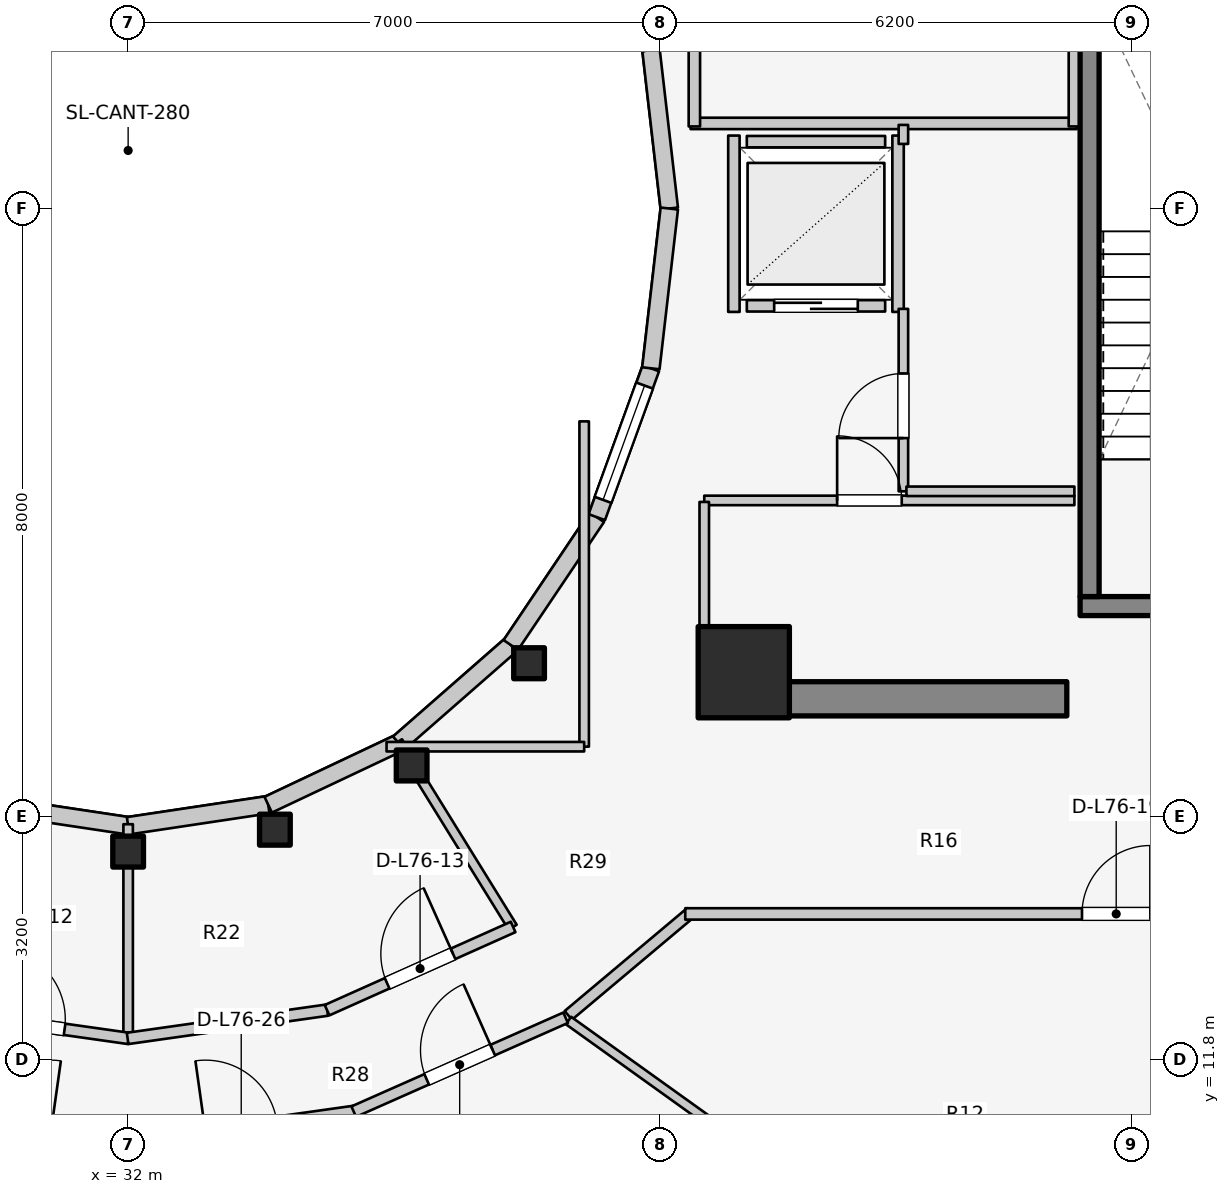
"""IFC4 building model, lengths in metres.
Left out: names, types, materials, properties, quantities, classifications, styles, units other than length and angle.
Written with IfcOpenShell. Run it as: python <this file> out.ifc"""

import sys

from ifc_helpers import new_model, si_unit, direction, frame, frame_2d, origin, origin_2d, place, context, subcontext, project, spatial, rectangle, i_section, extrude, element, fill, save


model = new_model("IFC4")
c1 = context("Model", 3, precision=1e-05, world=origin(), true_north=direction((0.0, 1.0)))
c2 = subcontext(c1, "Body", "Model", "MODEL_VIEW")
j1 = project(units=[si_unit("LENGTHUNIT", "METRE"), si_unit("PLANEANGLEUNIT", "RADIAN")], contexts=[c1])
p1 = place(None, origin())
s1 = spatial("IfcSite", under=j1, at=p1, CompositionType="ELEMENT")
p2 = place(p1, origin())
s2 = spatial("IfcBuilding", under=s1, at=p2, CompositionType="ELEMENT")
p3 = place(p2, frame((0.0, 0.0, 249.6)))
s3 = spatial("IfcBuildingStorey", under=s2, at=p3, CompositionType="ELEMENT", Elevation=249.6)
p4 = place(p3, frame((39.85, 16.55, 0.0), z_axis=(0.0, 0.0, 1.0), x_axis=(1.0, 0.0, 0.0)))
e1 = element("IfcWall", 1, at=p4, inside=s3, PredefinedType="SHEAR", context=c2, shape_type="SweptSolid", body=[
    extrude(rectangle(XDim=4.5, YDim=0.45, at=frame_2d((2.25, 0.0))), origin(), (0.0, 0.0, 1.0), 3.6),
])
p5 = place(p3, frame((44.525, 17.77, 0.0), z_axis=(0.0, 0.0, 1.0), x_axis=(1.0, 0.0, 0.0)))
e2 = element("IfcWall", 2, at=p5, inside=s3, PredefinedType="SOLIDWALL", context=c2, shape_type="SweptSolid", body=[
    extrude(rectangle(XDim=3.37, YDim=0.25, at=frame_2d((1.685, 0.0))), origin(), (0.0, 0.0, 1.0), 3.6),
])
p6 = place(p5, frame((1.135, 0.0, 0.0)))
e3 = element("IfcOpeningElement", 3, at=p6, cuts=e2, PredefinedType="OPENING", context=c2, shape_type="SweptSolid", body=[
    extrude(rectangle(XDim=1.1, YDim=2.1, at=frame_2d((0.55, 1.05))), frame((0.0, 0.135, 0.0), z_axis=(0.0, -1.0, 0.0), x_axis=(1.0, 0.0, 0.0)), (0.0, 0.0, 1.0), 0.27),
])
p7 = place(p3, frame((44.65, 17.895, 0.0), z_axis=(0.0, 0.0, 1.0), x_axis=(0.0, 1.0, 0.0)))
e4 = element("IfcWall", 4, at=p7, inside=s3, PredefinedType="SOLIDWALL", context=c2, shape_type="SweptSolid", body=[
    extrude(rectangle(XDim=7.81, YDim=0.25, at=frame_2d((3.905, 0.0))), origin(), (0.0, 0.0, 1.0), 3.6),
])
p8 = place(p3, frame((40.1, 16.9, 0.0), z_axis=(0.0, 0.0, 1.0), x_axis=(1.0, 0.0, 0.0)))
e5 = element("IfcColumn", 5, at=p8, inside=s3, PredefinedType="COLUMN", context=c2, shape_type="SweptSolid", body=[
    extrude(rectangle(XDim=1.2, YDim=1.2, at=origin_2d()), origin(), (0.0, 0.0, 1.0), 3.6),
])
for number, where, z_axis, x_axis in (
    (6, (32.0, 14.54, 0.0), (0.0, 0.0, 1.0), (1.0, 0.0, 0.0)),
    (7, (33.931, 14.828, 0.0), (0.0, 0.0, 1.0), (1.0, 0.0, 0.0)),
    (8, (35.73, 15.673, 0.0), (0.0, 0.0, 1.0), (1.0, 0.0, 0.0)),
    (9, (37.275, 17.018, 0.0), (0.0, 0.0, 1.0), (1.0, 0.0, 0.0)),
):
    element("IfcColumn", number, at=place(p3, frame(where, z_axis=z_axis, x_axis=x_axis)), inside=s3, PredefinedType="COLUMN", context=c2, shape_type="SweptSolid", body=[
        extrude(i_section(OverallWidth=0.404, OverallDepth=0.407, WebThickness=0.027, FlangeThickness=0.044, FilletRadius=0.025, at=origin_2d()), origin(), (0.0, 0.0, 1.0), 3.6),
    ])
p9 = place(p3, frame((39.12, 23.0, 0.0), z_axis=(0.0, 0.0, 1.0), x_axis=(-0.114711713601, 0.993398823617, 0.0)))
e10 = element("IfcWall", 10, at=p9, inside=s3, PredefinedType="STANDARD", context=c2, shape_type="SweptSolid", body=[
    extrude(rectangle(XDim=2.115, YDim=0.23, at=frame_2d((1.058, 0.0))), origin(), (0.0, 0.0, 1.0), 3.28),
])
for number, where, z_axis, x_axis in (
    (11, (30.157, 15.157, 0.0), (0.0, 0.0, 1.0), (0.989, -0.149, 0.0)),
    (12, (32.0, 14.88, 0.0), (0.0, 0.0, 1.0), (0.989, 0.149, 0.0)),
):
    element("IfcWall", number, at=place(p3, frame(where, z_axis=z_axis, x_axis=x_axis)), inside=s3, PredefinedType="STANDARD", context=c2, shape_type="SweptSolid", body=[
        extrude(rectangle(XDim=1.864, YDim=0.23, at=frame_2d((0.932, 0.0))), origin(), (0.0, 0.0, 1.0), 2.6),
    ])
p10 = place(p3, frame((33.843, 15.157, 0.0), z_axis=(0.0, 0.0, 1.0), x_axis=(0.904179699603, 0.427152280606, 0.0)))
e13 = element("IfcWall", 13, at=p10, inside=s3, PredefinedType="STANDARD", context=c2, shape_type="SweptSolid", body=[
    extrude(rectangle(XDim=1.899, YDim=0.23, at=frame_2d((0.95, 0.0))), origin(), (0.0, 0.0, 1.0), 2.6),
])
p11 = place(p3, frame((35.56, 15.968, 0.0), z_axis=(0.0, 0.0, 1.0), x_axis=(0.752576694707, 0.658504607869, 0.0)))
e14 = element("IfcWall", 14, at=p11, inside=s3, PredefinedType="STANDARD", context=c2, shape_type="SweptSolid", body=[
    extrude(rectangle(XDim=1.959, YDim=0.23, at=frame_2d((0.98, 0.0))), origin(), (0.0, 0.0, 1.0), 2.6),
])
p12 = place(p3, frame((37.035, 17.258, 0.0), z_axis=(0.0, 0.0, 1.0), x_axis=(0.558197800898, 0.829707909492, 0.0)))
e15 = element("IfcWall", 15, at=p12, inside=s3, PredefinedType="STANDARD", context=c2, shape_type="SweptSolid", body=[
    extrude(rectangle(XDim=2.027, YDim=0.23, at=frame_2d((1.013, 0.0))), origin(), (0.0, 0.0, 1.0), 2.6),
])
p13 = place(p3, frame((38.166, 18.94, 0.0), z_axis=(0.0, 0.0, 1.0), x_axis=(0.341423187295, 0.93990968033, 0.0)))
e16 = element("IfcWall", 16, at=p13, inside=s3, PredefinedType="STANDARD", context=c2, shape_type="SweptSolid", body=[
    extrude(rectangle(XDim=2.084, YDim=0.23, at=frame_2d((1.042, 0.0))), origin(), (0.0, 0.0, 1.0), 3.28),
])
p14 = place(p13, frame((0.242, 0.0, 0.85)))
e17 = element("IfcOpeningElement", 17, at=p14, cuts=e16, PredefinedType="OPENING", context=c2, shape_type="SweptSolid", body=[
    extrude(rectangle(XDim=1.6, YDim=1.65, at=frame_2d((0.8, 0.825))), frame((0.0, 0.125, 0.0), z_axis=(0.0, -1.0, 0.0), x_axis=(1.0, 0.0, 0.0)), (0.0, 0.0, 1.0), 0.25),
])
p15 = place(p3, frame((38.877, 20.898, 0.0), z_axis=(0.0, 0.0, 1.0), x_axis=(0.114711713601, 0.993398823617, 0.0)))
e18 = element("IfcWall", 18, at=p15, inside=s3, PredefinedType="STANDARD", context=c2, shape_type="SweptSolid", body=[
    extrude(rectangle(XDim=2.115, YDim=0.23, at=frame_2d((1.058, 0.0))), origin(), (0.0, 0.0, 1.0), 3.28),
])
p16 = place(p3, frame((40.14, 21.72, 0.0), z_axis=(0.0, 0.0, 1.0), x_axis=(1.0, 0.0, 0.0)))
e19 = element("IfcWall", 19, at=p16, inside=s3, PredefinedType="SOLIDWALL", context=c2, shape_type="SweptSolid", body=[
    extrude(rectangle(XDim=1.82, YDim=0.15, at=frame_2d((0.91, 0.0))), origin(), (0.0, 0.0, 1.0), 2.62),
])
p17 = place(p16, frame((0.36, 0.0, 0.0)))
e20 = element("IfcOpeningElement", 20, at=p17, cuts=e19, PredefinedType="OPENING", context=c2, shape_type="SweptSolid", body=[
    extrude(rectangle(XDim=1.1, YDim=2.1, at=frame_2d((0.55, 1.05))), frame((0.0, 0.085, 0.0), z_axis=(0.0, -1.0, 0.0), x_axis=(1.0, 0.0, 0.0)), (0.0, 0.0, 1.0), 0.17),
])
p18 = place(p3, frame((40.14, 23.88, 0.0), z_axis=(0.0, 0.0, 1.0), x_axis=(1.0, 0.0, 0.0)))
e21 = element("IfcWall", 21, at=p18, inside=s3, PredefinedType="SOLIDWALL", context=c2, shape_type="SweptSolid", body=[
    extrude(rectangle(XDim=1.82, YDim=0.15, at=frame_2d((0.91, 0.0))), origin(), (0.0, 0.0, 1.0), 2.62),
])
p19 = place(p3, frame((39.97, 21.64, 0.0), z_axis=(0.0, 0.0, 1.0), x_axis=(0.0, 1.0, 0.0)))
e22 = element("IfcWall", 22, at=p19, inside=s3, PredefinedType="SOLIDWALL", context=c2, shape_type="SweptSolid", body=[
    extrude(rectangle(XDim=2.32, YDim=0.15, at=frame_2d((1.16, 0.0))), origin(), (0.0, 0.0, 1.0), 2.62),
])
p20 = place(p3, frame((42.13, 21.64, 0.0), z_axis=(0.0, 0.0, 1.0), x_axis=(0.0, 1.0, 0.0)))
e23 = element("IfcWall", 23, at=p20, inside=s3, PredefinedType="SOLIDWALL", context=c2, shape_type="SweptSolid", body=[
    extrude(rectangle(XDim=2.32, YDim=0.15, at=frame_2d((1.16, 0.0))), origin(), (0.0, 0.0, 1.0), 3.295),
])
p21 = place(p3, frame((39.4, 24.12, 0.0), z_axis=(0.0, 0.0, 1.0), x_axis=(1.0, 0.0, 0.0)))
e24 = element("IfcWall", 24, at=p21, inside=s3, PredefinedType="PARTITIONING", context=c2, shape_type="SweptSolid", body=[
    extrude(rectangle(XDim=5.08, YDim=0.15, at=frame_2d((2.54, 0.0))), origin(), (0.0, 0.0, 1.0), 2.62),
])
p22 = place(p3, frame((44.45, 24.08, 0.0), z_axis=(0.0, 0.0, 1.0), x_axis=(0.0, 1.0, 0.0)))
e25 = element("IfcWall", 25, at=p22, inside=s3, PredefinedType="PARTITIONING", context=c2, shape_type="SweptSolid", body=[
    extrude(rectangle(XDim=3.2, YDim=0.15, at=frame_2d((1.6, 0.0))), origin(), (0.0, 0.0, 1.0), 3.295),
])
p23 = place(p3, frame((39.45, 24.08, 0.0), z_axis=(0.0, 0.0, 1.0), x_axis=(0.0, 1.0, 0.0)))
e26 = element("IfcWall", 26, at=p23, inside=s3, PredefinedType="PARTITIONING", context=c2, shape_type="SweptSolid", body=[
    extrude(rectangle(XDim=3.4, YDim=0.15, at=frame_2d((1.7, 0.0))), origin(), (0.0, 0.0, 1.0), 3.295),
])
p24 = place(p23, frame((1.894, 0.0, 0.0)))
e27 = element("IfcOpeningElement", 27, at=p24, cuts=e26, PredefinedType="OPENING", context=c2, shape_type="SweptSolid", body=[
    extrude(rectangle(XDim=1.1, YDim=2.1, at=frame_2d((0.55, 1.05))), frame((0.0, 0.085, 0.0), z_axis=(0.0, -1.0, 0.0), x_axis=(1.0, 0.0, 0.0)), (0.0, 0.0, 1.0), 0.17),
])
p25 = place(p3, frame((39.58, 19.16, 0.0), z_axis=(0.0, 0.0, 1.0), x_axis=(1.0, 0.0, 0.0)))
e28 = element("IfcWall", 28, at=p25, inside=s3, PredefinedType="PARTITIONING", context=c2, shape_type="SweptSolid", body=[
    extrude(rectangle(XDim=4.87, YDim=0.125, at=frame_2d((2.435, 0.0))), origin(), (0.0, 0.0, 1.0), 2.62),
])
p26 = place(p25, frame((1.748, 0.0, 0.0)))
e29 = element("IfcOpeningElement", 29, at=p26, cuts=e28, PredefinedType="OPENING", context=c2, shape_type="SweptSolid", body=[
    extrude(rectangle(XDim=0.85, YDim=2.05, at=frame_2d((0.425, 1.025))), frame((0.0, 0.073, 0.0), z_axis=(0.0, -1.0, 0.0), x_axis=(1.0, 0.0, 0.0)), (0.0, 0.0, 1.0), 0.145),
])
p27 = place(p3, frame((39.58, 17.1, 0.0), z_axis=(0.0, 0.0, 1.0), x_axis=(0.0, 1.0, 0.0)))
e30 = element("IfcWall", 30, at=p27, inside=s3, PredefinedType="PARTITIONING", context=c2, shape_type="SweptSolid", body=[
    extrude(rectangle(XDim=2.04, YDim=0.125, at=frame_2d((1.02, 0.0))), origin(), (0.0, 0.0, 1.0), 2.672),
])
p28 = place(p3, frame((42.2, 19.28, 0.0), z_axis=(0.0, 0.0, 1.0), x_axis=(0.0, 1.0, 0.0)))
e31 = element("IfcWall", 31, at=p28, inside=s3, PredefinedType="PARTITIONING", context=c2, shape_type="SweptSolid", body=[
    extrude(rectangle(XDim=2.4, YDim=0.125, at=frame_2d((1.2, 0.0))), origin(), (0.0, 0.0, 1.0), 3.295),
])
p29 = place(p28, frame((0.7, 0.0, 0.0)))
e32 = element("IfcOpeningElement", 32, at=p29, cuts=e31, PredefinedType="OPENING", context=c2, shape_type="SweptSolid", body=[
    extrude(rectangle(XDim=0.85, YDim=2.05, at=frame_2d((0.425, 1.025))), frame((0.0, 0.073, 0.0), z_axis=(0.0, -1.0, 0.0), x_axis=(1.0, 0.0, 0.0)), (0.0, 0.0, 1.0), 0.145),
])
p30 = place(p3, frame((42.2, 23.85, 0.0), z_axis=(0.0, 0.0, 1.0), x_axis=(0.0, 1.0, 0.0)))
e33 = element("IfcWall", 33, at=p30, inside=s3, PredefinedType="PARTITIONING", context=c2, shape_type="SweptSolid", body=[
    extrude(rectangle(XDim=0.25, YDim=0.125, at=frame_2d((0.125, 0.0))), origin(), (0.0, 0.0, 1.0), 3.295),
])
p31 = place(p3, frame((42.24, 19.28, 0.0), z_axis=(0.0, 0.0, 1.0), x_axis=(1.0, 0.0, 0.0)))
e34 = element("IfcWall", 34, at=p31, inside=s3, PredefinedType="PARTITIONING", context=c2, shape_type="SweptSolid", body=[
    extrude(rectangle(XDim=2.21, YDim=0.125, at=frame_2d((1.105, 0.0))), origin(), (0.0, 0.0, 1.0), 2.62),
])
p32 = place(p3, frame((32.0, 14.9, 0.0), z_axis=(0.0, 0.0, 1.0), x_axis=(0.0, -1.0, 0.0)))
e35 = element("IfcWall", 35, at=p32, inside=s3, PredefinedType="PARTITIONING", context=c2, shape_type="SweptSolid", body=[
    extrude(rectangle(XDim=2.818, YDim=0.125, at=frame_2d((1.409, 0.0))), origin(), (0.0, 0.0, 1.0), 2.672),
])
p33 = place(p3, frame((35.55, 15.985, 0.0), z_axis=(0.0, 0.0, 1.0), x_axis=(0.52592395012, -0.850531597702, 0.0)))
e36 = element("IfcWall", 36, at=p33, inside=s3, PredefinedType="PARTITIONING", context=c2, shape_type="SweptSolid", body=[
    extrude(rectangle(XDim=2.869, YDim=0.125, at=frame_2d((1.435, 0.0))), origin(), (0.0, 0.0, 1.0), 2.672),
])
p34 = place(p3, frame((29.38, 12.455, 0.0), z_axis=(0.0, 0.0, 1.0), x_axis=(0.990096156252, -0.140390887794, 0.0)))
e37 = element("IfcWall", 37, at=p34, inside=s3, PredefinedType="PARTITIONING", context=c2, shape_type="SweptSolid", body=[
    extrude(rectangle(XDim=2.654, YDim=0.15, at=frame_2d((1.327, 0.0))), origin(), (0.0, 0.0, 1.0), 2.816),
])
p35 = place(p34, frame((0.852, 0.0, 0.0)))
e38 = element("IfcOpeningElement", 38, at=p35, cuts=e37, PredefinedType="OPENING", context=c2, shape_type="SweptSolid", body=[
    extrude(rectangle(XDim=0.95, YDim=2.1, at=frame_2d((0.475, 1.05))), frame((0.0, 0.085, 0.0), z_axis=(0.0, -1.0, 0.0), x_axis=(1.0, 0.0, 0.0)), (0.0, 0.0, 1.0), 0.17),
])
p36 = place(p3, frame((31.993, 12.082, 0.0), z_axis=(0.0, 0.0, 1.0), x_axis=(0.990096156252, 0.140390887794, 0.0)))
e39 = element("IfcWall", 39, at=p36, inside=s3, PredefinedType="PARTITIONING", context=c2, shape_type="SweptSolid", body=[
    extrude(rectangle(XDim=2.654, YDim=0.15, at=frame_2d((1.327, 0.0))), origin(), (0.0, 0.0, 1.0), 2.816),
])
p37 = place(p3, frame((34.617, 12.454, 0.0), z_axis=(0.0, 0.0, 1.0), x_axis=(0.912859324183, 0.408274239027, 0.0)))
e40 = element("IfcWall", 40, at=p37, inside=s3, PredefinedType="PARTITIONING", context=c2, shape_type="SweptSolid", body=[
    extrude(rectangle(XDim=2.682, YDim=0.15, at=frame_2d((1.341, 0.0))), origin(), (0.0, 0.0, 1.0), 2.816),
])
p38 = place(p37, frame((0.866, 0.0, 0.0)))
e41 = element("IfcOpeningElement", 41, at=p38, cuts=e40, PredefinedType="OPENING", context=c2, shape_type="SweptSolid", body=[
    extrude(rectangle(XDim=0.95, YDim=2.1, at=frame_2d((0.475, 1.05))), frame((0.0, 0.085, 0.0), z_axis=(0.0, -1.0, 0.0), x_axis=(1.0, 0.0, 0.0)), (0.0, 0.0, 1.0), 0.17),
])
p39 = place(p3, frame((38.0, 15.92, 0.0), z_axis=(0.0, 0.0, 1.0), x_axis=(0.0, 1.0, 0.0)))
e42 = element("IfcWall", 42, at=p39, inside=s3, PredefinedType="PARTITIONING", context=c2, shape_type="SweptSolid", body=[
    extrude(rectangle(XDim=4.28, YDim=0.125, at=frame_2d((2.14, 0.0))), origin(), (0.0, 0.0, 1.0), 2.672),
])
p40 = place(p3, frame((35.4, 15.92, 0.0), z_axis=(0.0, 0.0, 1.0), x_axis=(1.0, 0.0, 0.0)))
e43 = element("IfcWall", 43, at=p40, inside=s3, PredefinedType="PARTITIONING", context=c2, shape_type="SweptSolid", body=[
    extrude(rectangle(XDim=2.6, YDim=0.125, at=frame_2d((1.3, 0.0))), origin(), (0.0, 0.0, 1.0), 2.672),
])
p41 = place(p3, frame((37.791, 12.385, 0.0), z_axis=(0.0, 0.0, 1.0), x_axis=(0.765677451641, 0.643224719711, 0.0)))
e44 = element("IfcWall", 44, at=p41, inside=s3, PredefinedType="PARTITIONING", context=c2, shape_type="SweptSolid", body=[
    extrude(rectangle(XDim=2.105, YDim=0.15, at=frame_2d((1.053, 0.0))), origin(), (0.0, 0.0, 1.0), 2.816),
])
p42 = place(p3, frame((39.33, 13.72, 0.0), z_axis=(0.0, 0.0, 1.0), x_axis=(1.0, 0.0, 0.0)))
e45 = element("IfcWall", 45, at=p42, inside=s3, PredefinedType="PARTITIONING", context=c2, shape_type="SweptSolid", body=[
    extrude(rectangle(XDim=7.52, YDim=0.15, at=frame_2d((3.76, 0.0))), origin(), (0.0, 0.0, 1.0), 2.816),
])
p43 = place(p42, frame((5.22, 0.0, 0.0)))
e46 = element("IfcOpeningElement", 46, at=p43, cuts=e45, PredefinedType="OPENING", context=c2, shape_type="SweptSolid", body=[
    extrude(rectangle(XDim=0.9, YDim=2.1, at=frame_2d((0.45, 1.05))), frame((0.0, 0.085, 0.0), z_axis=(0.0, -1.0, 0.0), x_axis=(1.0, 0.0, 0.0)), (0.0, 0.0, 1.0), 0.17),
])
p44 = place(p3, frame((35.008, 11.076, 0.0), z_axis=(0.0, 0.0, 1.0), x_axis=(0.582726066442, -0.812668648029, 0.0)))
e47 = element("IfcWall", 47, at=p44, inside=s3, PredefinedType="MOVABLE", context=c2, shape_type="SweptSolid", body=[
    extrude(rectangle(XDim=6.515, YDim=0.12, at=frame_2d((3.257, 0.0))), origin(), (0.0, 0.0, 1.0), 2.66),
])
p45 = place(p3, frame((37.794, 12.318, 0.0), z_axis=(0.0, 0.0, 1.0), x_axis=(0.812763742602, -0.582593424879, 0.0)))
e48 = element("IfcWall", 48, at=p45, inside=s3, PredefinedType="MOVABLE", context=c2, shape_type="SweptSolid", body=[
    extrude(rectangle(XDim=6.966, YDim=0.12, at=frame_2d((3.483, 0.0))), origin(), (0.0, 0.0, 1.0), 2.66),
])
p46 = place(p3, frame((29.016, 11.123, 0.0), z_axis=(0.0, 0.0, 1.0), x_axis=(0.990225561979, -0.139475217886, 0.0)))
e49 = element("IfcWall", 49, at=p46, inside=s3, PredefinedType="PARTITIONING", context=c2, shape_type="SweptSolid", body=[
    extrude(rectangle(XDim=3.021, YDim=0.15, at=frame_2d((1.511, 0.0))), origin(), (0.0, 0.0, 1.0), 2.816),
])
p47 = place(p46, frame((1.036, 0.0, 0.0)))
e50 = element("IfcOpeningElement", 50, at=p47, cuts=e49, PredefinedType="OPENING", context=c2, shape_type="SweptSolid", body=[
    extrude(rectangle(XDim=0.95, YDim=2.1, at=frame_2d((0.475, 1.05))), frame((0.0, 0.085, 0.0), z_axis=(0.0, -1.0, 0.0), x_axis=(1.0, 0.0, 0.0)), (0.0, 0.0, 1.0), 0.17),
])
p48 = place(p3, frame((31.992, 10.702, 0.0), z_axis=(0.0, 0.0, 1.0), x_axis=(0.990225561979, 0.139475217886, 0.0)))
e51 = element("IfcWall", 51, at=p48, inside=s3, PredefinedType="PARTITIONING", context=c2, shape_type="SweptSolid", body=[
    extrude(rectangle(XDim=3.021, YDim=0.15, at=frame_2d((1.511, 0.0))), origin(), (0.0, 0.0, 1.0), 2.816),
])
p49 = place(p48, frame((1.036, 0.0, 0.0)))
e52 = element("IfcOpeningElement", 52, at=p49, cuts=e51, PredefinedType="OPENING", context=c2, shape_type="SweptSolid", body=[
    extrude(rectangle(XDim=0.95, YDim=2.1, at=frame_2d((0.475, 1.05))), frame((0.0, 0.085, 0.0), z_axis=(0.0, -1.0, 0.0), x_axis=(1.0, 0.0, 0.0)), (0.0, 0.0, 1.0), 0.17),
])
p50 = place(p3, frame((34.968, 11.119, 0.0), z_axis=(0.0, 0.0, 1.0), x_axis=(0.914302802833, 0.405031337963, 0.0)))
e53 = element("IfcWall", 53, at=p50, inside=s3, PredefinedType="PARTITIONING", context=c2, shape_type="SweptSolid", body=[
    extrude(rectangle(XDim=3.049, YDim=0.15, at=frame_2d((1.525, 0.0))), origin(), (0.0, 0.0, 1.0), 2.816),
])
p51 = place(p50, frame((1.05, 0.0, 0.0)))
e54 = element("IfcOpeningElement", 54, at=p51, cuts=e53, PredefinedType="OPENING", context=c2, shape_type="SweptSolid", body=[
    extrude(rectangle(XDim=0.95, YDim=2.1, at=frame_2d((0.475, 1.05))), frame((0.0, 0.085, 0.0), z_axis=(0.0, -1.0, 0.0), x_axis=(1.0, 0.0, 0.0)), (0.0, 0.0, 1.0), 0.17),
])
p52 = place(p14, origin())
e55 = element("IfcWindow", 55, at=p52, inside=s3, PartitioningType="SINGLE_PANEL", PredefinedType="WINDOW", context=c2, shape_type="SweptSolid", body=[
    extrude(rectangle(XDim=1.6, YDim=1.65, at=frame_2d((0.8, 0.825))), frame((0.0, 0.03, 0.0), z_axis=(0.0, -1.0, 0.0), x_axis=(1.0, 0.0, 0.0)), (0.0, 0.0, 1.0), 0.06),
])
fill(e17, e55)
p53 = place(p17, origin())
e56 = element("IfcDoor", 56, at=p53, inside=s3, OperationType="DOUBLE_DOOR_SLIDING", PredefinedType="DOOR", context=c2, shape_type="SweptSolid", body=[
    extrude(rectangle(XDim=1.1, YDim=2.1, at=frame_2d((0.55, 1.05))), frame((0.0, 0.025, 0.0), z_axis=(0.0, -1.0, 0.0), x_axis=(1.0, 0.0, 0.0)), (0.0, 0.0, 1.0), 0.05),
])
fill(e20, e56)
p54 = place(p26, origin())
e57 = element("IfcDoor", 57, at=p54, inside=s3, OperationType="SINGLE_SWING_LEFT", PredefinedType="DOOR", context=c2, shape_type="SweptSolid", body=[
    extrude(rectangle(XDim=0.85, YDim=2.05, at=frame_2d((0.425, 1.025))), frame((0.0, 0.025, 0.0), z_axis=(0.0, -1.0, 0.0), x_axis=(1.0, 0.0, 0.0)), (0.0, 0.0, 1.0), 0.05),
])
fill(e29, e57)
p55 = place(p29, origin())
e58 = element("IfcDoor", 58, at=p55, inside=s3, OperationType="SINGLE_SWING_LEFT", PredefinedType="DOOR", context=c2, shape_type="SweptSolid", body=[
    extrude(rectangle(XDim=0.85, YDim=2.05, at=frame_2d((0.425, 1.025))), frame((0.0, 0.025, 0.0), z_axis=(0.0, -1.0, 0.0), x_axis=(1.0, 0.0, 0.0)), (0.0, 0.0, 1.0), 0.05),
])
fill(e32, e58)
p56 = place(p35, origin())
e59 = element("IfcDoor", 59, at=p56, inside=s3, OperationType="SINGLE_SWING_LEFT", PredefinedType="DOOR", context=c2, shape_type="SweptSolid", body=[
    extrude(rectangle(XDim=0.95, YDim=2.1, at=frame_2d((0.475, 1.05))), frame((0.0, 0.025, 0.0), z_axis=(0.0, -1.0, 0.0), x_axis=(1.0, 0.0, 0.0)), (0.0, 0.0, 1.0), 0.05),
])
fill(e38, e59)
p57 = place(p38, origin())
e60 = element("IfcDoor", 60, at=p57, inside=s3, OperationType="SINGLE_SWING_RIGHT", PredefinedType="DOOR", context=c2, shape_type="SweptSolid", body=[
    extrude(rectangle(XDim=0.95, YDim=2.1, at=frame_2d((0.475, 1.05))), frame((0.0, 0.025, 0.0), z_axis=(0.0, -1.0, 0.0), x_axis=(1.0, 0.0, 0.0)), (0.0, 0.0, 1.0), 0.05),
])
fill(e41, e60)
p58 = place(p43, origin())
e61 = element("IfcDoor", 61, at=p58, inside=s3, OperationType="SINGLE_SWING_RIGHT", PredefinedType="DOOR", context=c2, shape_type="SweptSolid", body=[
    extrude(rectangle(XDim=0.9, YDim=2.1, at=frame_2d((0.45, 1.05))), frame((0.0, 0.025, 0.0), z_axis=(0.0, -1.0, 0.0), x_axis=(1.0, 0.0, 0.0)), (0.0, 0.0, 1.0), 0.05),
])
fill(e46, e61)
p59 = place(p51, origin())
e62 = element("IfcDoor", 62, at=p59, inside=s3, OperationType="SINGLE_SWING_RIGHT", PredefinedType="DOOR", context=c2, shape_type="SweptSolid", body=[
    extrude(rectangle(XDim=0.95, YDim=2.1, at=frame_2d((0.475, 1.05))), frame((0.0, 0.025, 0.0), z_axis=(0.0, -1.0, 0.0), x_axis=(1.0, 0.0, 0.0)), (0.0, 0.0, 1.0), 0.05),
])
fill(e54, e62)
save(model, sys.argv[1])
